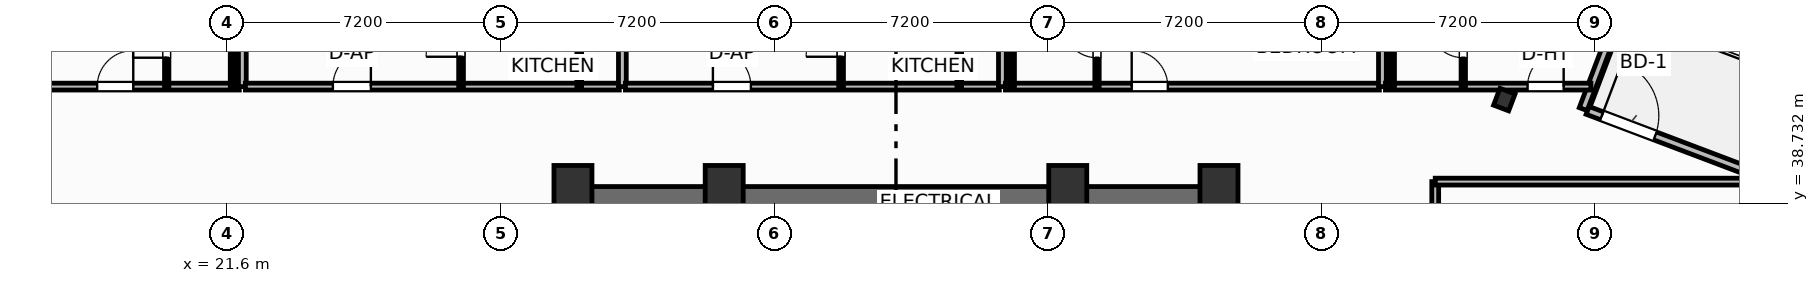
"""IFC4 building model, lengths in metres.
Left out: names, types, materials, properties, quantities, classifications, styles, units other than length and angle.
Written with IfcOpenShell. Run it as: python <this file> out.ifc"""

import sys

from ifc_helpers import new_model, si_unit, direction, frame, frame_2d, origin, origin_2d, place, context, subcontext, project, spatial, rectangle, i_section, extrude, element, fill, save


model = new_model("IFC4")
c1 = context("Model", 3, precision=1e-05, world=origin(), true_north=direction((0.0, 1.0)))
c2 = subcontext(c1, "Body", "Model", "MODEL_VIEW")
j1 = project(units=[si_unit("LENGTHUNIT", "METRE"), si_unit("PLANEANGLEUNIT", "RADIAN")], contexts=[c1])
p1 = place(None, origin())
s1 = spatial("IfcSite", under=j1, at=p1, CompositionType="ELEMENT")
p2 = place(p1, origin())
s2 = spatial("IfcBuilding", under=s1, at=p2, CompositionType="ELEMENT")
p3 = place(p2, frame((0.0, 0.0, 102.1)))
s3 = spatial("IfcBuildingStorey", under=s2, at=p3, CompositionType="ELEMENT", Elevation=102.1)
for number, where, z_axis, x_axis in (
    (1, (30.7, 39.05, 0.0), (0.0, 0.0, 1.0), (1.0, 0.0, 0.0)),
    (2, (34.68, 39.05, 0.0), (0.0, 0.0, 1.0), (1.0, 0.0, 0.0)),
    (3, (43.72, 39.05, 0.0), (0.0, 0.0, 1.0), (1.0, 0.0, 0.0)),
    (4, (47.7, 39.05, 0.0), (0.0, 0.0, 1.0), (1.0, 0.0, 0.0)),
):
    element("IfcColumn", number, at=place(p3, frame(where, z_axis=z_axis, x_axis=x_axis)), inside=s3, PredefinedType="COLUMN", context=c2, shape_type="SweptSolid", body=[
        extrude(rectangle(XDim=1.0, YDim=1.35, at=origin_2d()), origin(), (0.0, 0.0, 1.0), 3.7),
    ])
p4 = place(p3, frame((30.38, 38.795, 0.0), z_axis=(0.0, 0.0, 1.0), x_axis=(1.0, 0.0, 0.0)))
e5 = element("IfcWall", 5, at=p4, inside=s3, PredefinedType="SHEAR", context=c2, shape_type="SweptSolid", body=[
    extrude(rectangle(XDim=17.64, YDim=0.75, at=frame_2d((8.82, 0.0))), origin(), (0.0, 0.0, 1.0), 3.45),
])
p5 = place(p3, frame((55.208, 41.459, 0.0), z_axis=(0.0, 0.0, 1.0), x_axis=(0.935221751401, -0.354062530786, 0.0)))
e6 = element("IfcColumn", 6, at=p5, inside=s3, PredefinedType="COLUMN", context=c2, shape_type="SweptSolid", body=[
    extrude(i_section(OverallWidth=0.424, OverallDepth=0.474, WebThickness=0.048, FlangeThickness=0.077, FilletRadius=0.025, at=origin_2d()), origin(), (0.0, 0.0, 1.0), 3.7),
])
p6 = place(p3, frame((57.399, 41.175, 0.0), z_axis=(0.0, 0.0, 1.0), x_axis=(0.935227640088, -0.354046976001, 0.0)))
e7 = element("IfcWall", 7, at=p6, inside=s3, PredefinedType="SOLIDWALL", context=c2, shape_type="SweptSolid", body=[
    extrude(rectangle(XDim=6.0, YDim=0.22, at=frame_2d((3.0, 0.0))), origin(), (0.0, 0.0, 1.0), 2.73),
])
p7 = place(p6, frame((0.4, 0.0, 0.0)))
e8 = element("IfcOpeningElement", 8, at=p7, cuts=e7, PredefinedType="OPENING", context=c2, shape_type="SweptSolid", body=[
    extrude(rectangle(XDim=1.5, YDim=2.25, at=frame_2d((0.75, 1.125))), frame((0.0, 0.12, 0.0), z_axis=(0.0, -1.0, 0.0), x_axis=(1.0, 0.0, 0.0)), (0.0, 0.0, 1.0), 0.24),
])
p8 = place(p3, frame((57.284, 41.208, 0.0), z_axis=(0.0, 0.0, 1.0), x_axis=(0.354128469405, 0.935196785258, 0.0)))
e9 = element("IfcWall", 9, at=p8, inside=s3, PredefinedType="SOLIDWALL", context=c2, shape_type="SweptSolid", body=[
    extrude(rectangle(XDim=2.1, YDim=0.22, at=frame_2d((1.05, 0.0))), origin(), (0.0, 0.0, 1.0), 2.73),
])
p9 = place(p3, frame((5.646, 41.8, 0.0), z_axis=(0.0, 0.0, 1.0), x_axis=(1.0, 0.0, 0.0)))
e10 = element("IfcWall", 10, at=p9, inside=s3, PredefinedType="PARTITIONING", context=c2, shape_type="SweptSolid", body=[
    extrude(rectangle(XDim=16.274, YDim=0.18, at=frame_2d((8.137, 0.0))), origin(), (0.0, 0.0, 1.0), 3.45),
])
p10 = place(p9, frame((12.534, 0.0, 0.0)))
e11 = element("IfcOpeningElement", 11, at=p10, cuts=e10, PredefinedType="OPENING", context=c2, shape_type="SweptSolid", body=[
    extrude(rectangle(XDim=0.95, YDim=2.15, at=frame_2d((0.475, 1.075))), frame((0.0, 0.1, 0.0), z_axis=(0.0, -1.0, 0.0), x_axis=(1.0, 0.0, 0.0)), (0.0, 0.0, 1.0), 0.2),
])
p11 = place(p3, frame((20.01, 41.8, 0.0), z_axis=(0.0, 0.0, 1.0), x_axis=(0.0, 1.0, 0.0)))
e12 = element("IfcWall", 12, at=p11, inside=s3, PredefinedType="PARTITIONING", context=c2, shape_type="SweptSolid", body=[
    extrude(rectangle(XDim=2.52, YDim=0.115, at=frame_2d((1.26, 0.0))), origin(), (0.0, 0.0, 1.0), 3.45),
])
p12 = place(p11, frame((0.76, 0.0, 0.0)))
e13 = element("IfcOpeningElement", 13, at=p12, cuts=e12, PredefinedType="OPENING", context=c2, shape_type="SweptSolid", body=[
    extrude(rectangle(XDim=0.9, YDim=2.05, at=frame_2d((0.45, 1.025))), frame((0.0, 0.067, 0.0), z_axis=(0.0, -1.0, 0.0), x_axis=(1.0, 0.0, 0.0)), (0.0, 0.0, 1.0), 0.135),
])
p13 = place(p3, frame((21.74, 41.8, 0.0), z_axis=(0.0, 0.0, 1.0), x_axis=(0.0, 1.0, 0.0)))
e14 = element("IfcWall", 14, at=p13, inside=s3, PredefinedType="PARTITIONING", context=c2, shape_type="SweptSolid", body=[
    extrude(rectangle(XDim=2.52, YDim=0.115, at=frame_2d((1.26, 0.0))), origin(), (0.0, 0.0, 1.0), 3.45),
])
p14 = place(p3, frame((22.0, 41.8, 0.0), z_axis=(0.0, 0.0, 1.0), x_axis=(0.0, 1.0, 0.0)))
e15 = element("IfcWall", 15, at=p14, inside=s3, PredefinedType="PARTITIONING", context=c2, shape_type="SweptSolid", body=[
    extrude(rectangle(XDim=14.906, YDim=0.205, at=frame_2d((7.453, 0.0))), origin(), (0.0, 0.0, 1.0), 3.45),
])
p15 = place(p3, frame((22.08, 41.8, 0.0), z_axis=(0.0, 0.0, 1.0), x_axis=(1.0, 0.0, 0.0)))
e16 = element("IfcWall", 16, at=p15, inside=s3, PredefinedType="PARTITIONING", context=c2, shape_type="SweptSolid", body=[
    extrude(rectangle(XDim=9.84, YDim=0.18, at=frame_2d((4.92, 0.0))), origin(), (0.0, 0.0, 1.0), 3.45),
])
p16 = place(p15, frame((2.302, 0.0, 0.0)))
e17 = element("IfcOpeningElement", 17, at=p16, cuts=e16, PredefinedType="OPENING", context=c2, shape_type="SweptSolid", body=[
    extrude(rectangle(XDim=1.0, YDim=2.2, at=frame_2d((0.5, 1.1))), frame((0.0, 0.1, 0.0), z_axis=(0.0, -1.0, 0.0), x_axis=(1.0, 0.0, 0.0)), (0.0, 0.0, 1.0), 0.2),
])
p17 = place(p3, frame((27.755, 41.8, 0.0), z_axis=(0.0, 0.0, 1.0), x_axis=(0.0, 1.0, 0.0)))
e18 = element("IfcWall", 18, at=p17, inside=s3, PredefinedType="PARTITIONING", context=c2, shape_type="SweptSolid", body=[
    extrude(rectangle(XDim=12.811, YDim=0.125, at=frame_2d((6.405, 0.0))), origin(), (0.0, 0.0, 1.0), 3.45),
])
p18 = place(p17, frame((0.785, 0.0, 0.0)))
e19 = element("IfcOpeningElement", 19, at=p18, cuts=e18, PredefinedType="OPENING", context=c2, shape_type="SweptSolid", body=[
    extrude(rectangle(XDim=0.92, YDim=2.05, at=frame_2d((0.46, 1.025))), frame((0.0, 0.073, 0.0), z_axis=(0.0, -1.0, 0.0), x_axis=(1.0, 0.0, 0.0)), (0.0, 0.0, 1.0), 0.145),
])
p19 = place(p17, frame((3.037, 0.0, 0.0)))
e20 = element("IfcOpeningElement", 20, at=p19, cuts=e18, PredefinedType="OPENING", context=c2, shape_type="SweptSolid", body=[
    extrude(rectangle(XDim=0.9, YDim=2.05, at=frame_2d((0.45, 1.025))), frame((0.0, 0.073, 0.0), z_axis=(0.0, -1.0, 0.0), x_axis=(1.0, 0.0, 0.0)), (0.0, 0.0, 1.0), 0.145),
])
p20 = place(p17, frame((10.089, 0.0, 0.0)))
e21 = element("IfcOpeningElement", 21, at=p20, cuts=e18, PredefinedType="OPENING", context=c2, shape_type="SweptSolid", body=[
    extrude(rectangle(XDim=0.92, YDim=2.05, at=frame_2d((0.46, 1.025))), frame((0.0, 0.073, 0.0), z_axis=(0.0, -1.0, 0.0), x_axis=(1.0, 0.0, 0.0)), (0.0, 0.0, 1.0), 0.145),
])
p21 = place(p3, frame((30.865, 41.8, 0.0), z_axis=(0.0, 0.0, 1.0), x_axis=(0.0, 1.0, 0.0)))
e22 = element("IfcWall", 22, at=p21, inside=s3, PredefinedType="PARTITIONING", context=c2, shape_type="SweptSolid", body=[
    extrude(rectangle(XDim=2.41, YDim=0.125, at=frame_2d((1.205, 0.0))), origin(), (0.0, 0.0, 1.0), 3.45),
])
p22 = place(p3, frame((32.0, 41.8, 0.0), z_axis=(0.0, 0.0, 1.0), x_axis=(0.0, 1.0, 0.0)))
e23 = element("IfcWall", 23, at=p22, inside=s3, PredefinedType="PARTITIONING", context=c2, shape_type="SweptSolid", body=[
    extrude(rectangle(XDim=8.958, YDim=0.205, at=frame_2d((4.479, 0.0))), origin(), (0.0, 0.0, 1.0), 3.45),
])
p23 = place(p3, frame((32.08, 41.8, 0.0), z_axis=(0.0, 0.0, 1.0), x_axis=(1.0, 0.0, 0.0)))
e24 = element("IfcWall", 24, at=p23, inside=s3, PredefinedType="PARTITIONING", context=c2, shape_type="SweptSolid", body=[
    extrude(rectangle(XDim=9.84, YDim=0.18, at=frame_2d((4.92, 0.0))), origin(), (0.0, 0.0, 1.0), 3.45),
])
p24 = place(p23, frame((2.302, 0.0, 0.0)))
e25 = element("IfcOpeningElement", 25, at=p24, cuts=e24, PredefinedType="OPENING", context=c2, shape_type="SweptSolid", body=[
    extrude(rectangle(XDim=1.0, YDim=2.2, at=frame_2d((0.5, 1.1))), frame((0.0, 0.1, 0.0), z_axis=(0.0, -1.0, 0.0), x_axis=(1.0, 0.0, 0.0)), (0.0, 0.0, 1.0), 0.2),
])
p25 = place(p3, frame((37.755, 41.8, 0.0), z_axis=(0.0, 0.0, 1.0), x_axis=(0.0, 1.0, 0.0)))
e26 = element("IfcWall", 26, at=p25, inside=s3, PredefinedType="PARTITIONING", context=c2, shape_type="SweptSolid", body=[
    extrude(rectangle(XDim=9.025, YDim=0.125, at=frame_2d((4.512, 0.0))), origin(), (0.0, 0.0, 1.0), 3.45),
])
p26 = place(p25, frame((0.785, 0.0, 0.0)))
e27 = element("IfcOpeningElement", 27, at=p26, cuts=e26, PredefinedType="OPENING", context=c2, shape_type="SweptSolid", body=[
    extrude(rectangle(XDim=0.92, YDim=2.05, at=frame_2d((0.46, 1.025))), frame((0.0, 0.073, 0.0), z_axis=(0.0, -1.0, 0.0), x_axis=(1.0, 0.0, 0.0)), (0.0, 0.0, 1.0), 0.145),
])
p27 = place(p25, frame((3.037, 0.0, 0.0)))
e28 = element("IfcOpeningElement", 28, at=p27, cuts=e26, PredefinedType="OPENING", context=c2, shape_type="SweptSolid", body=[
    extrude(rectangle(XDim=0.9, YDim=2.05, at=frame_2d((0.45, 1.025))), frame((0.0, 0.073, 0.0), z_axis=(0.0, -1.0, 0.0), x_axis=(1.0, 0.0, 0.0)), (0.0, 0.0, 1.0), 0.145),
])
p28 = place(p25, frame((6.678, 0.0, 0.0)))
e29 = element("IfcOpeningElement", 29, at=p28, cuts=e26, PredefinedType="OPENING", context=c2, shape_type="SweptSolid", body=[
    extrude(rectangle(XDim=0.92, YDim=2.05, at=frame_2d((0.46, 1.025))), frame((0.0, 0.073, 0.0), z_axis=(0.0, -1.0, 0.0), x_axis=(1.0, 0.0, 0.0)), (0.0, 0.0, 1.0), 0.145),
])
p29 = place(p3, frame((40.865, 41.8, 0.0), z_axis=(0.0, 0.0, 1.0), x_axis=(0.0, 1.0, 0.0)))
e30 = element("IfcWall", 30, at=p29, inside=s3, PredefinedType="PARTITIONING", context=c2, shape_type="SweptSolid", body=[
    extrude(rectangle(XDim=2.41, YDim=0.125, at=frame_2d((1.205, 0.0))), origin(), (0.0, 0.0, 1.0), 3.45),
])
p30 = place(p3, frame((42.0, 41.8, 0.0), z_axis=(0.0, 0.0, 1.0), x_axis=(0.0, 1.0, 0.0)))
e31 = element("IfcWall", 31, at=p30, inside=s3, PredefinedType="PARTITIONING", context=c2, shape_type="SweptSolid", body=[
    extrude(rectangle(XDim=7.418, YDim=0.205, at=frame_2d((3.709, 0.0))), origin(), (0.0, 0.0, 1.0), 3.45),
])
p31 = place(p3, frame((42.08, 41.8, 0.0), z_axis=(0.0, 0.0, 1.0), x_axis=(1.0, 0.0, 0.0)))
e32 = element("IfcWall", 32, at=p31, inside=s3, PredefinedType="PARTITIONING", context=c2, shape_type="SweptSolid", body=[
    extrude(rectangle(XDim=9.84, YDim=0.18, at=frame_2d((4.92, 0.0))), origin(), (0.0, 0.0, 1.0), 3.45),
])
p32 = place(p31, frame((3.323, 0.0, 0.0)))
e33 = element("IfcOpeningElement", 33, at=p32, cuts=e32, PredefinedType="OPENING", context=c2, shape_type="SweptSolid", body=[
    extrude(rectangle(XDim=0.95, YDim=2.15, at=frame_2d((0.475, 1.075))), frame((0.0, 0.1, 0.0), z_axis=(0.0, -1.0, 0.0), x_axis=(1.0, 0.0, 0.0)), (0.0, 0.0, 1.0), 0.2),
])
p33 = place(p3, frame((44.49, 41.8, 0.0), z_axis=(0.0, 0.0, 1.0), x_axis=(0.0, 1.0, 0.0)))
e34 = element("IfcWall", 34, at=p33, inside=s3, PredefinedType="PARTITIONING", context=c2, shape_type="SweptSolid", body=[
    extrude(rectangle(XDim=2.52, YDim=0.115, at=frame_2d((1.26, 0.0))), origin(), (0.0, 0.0, 1.0), 3.45),
])
p34 = place(p33, frame((0.76, 0.0, 0.0)))
e35 = element("IfcOpeningElement", 35, at=p34, cuts=e34, PredefinedType="OPENING", context=c2, shape_type="SweptSolid", body=[
    extrude(rectangle(XDim=0.9, YDim=2.05, at=frame_2d((0.45, 1.025))), frame((0.0, 0.067, 0.0), z_axis=(0.0, -1.0, 0.0), x_axis=(1.0, 0.0, 0.0)), (0.0, 0.0, 1.0), 0.135),
])
p35 = place(p3, frame((42.26, 41.8, 0.0), z_axis=(0.0, 0.0, 1.0), x_axis=(0.0, 1.0, 0.0)))
e36 = element("IfcWall", 36, at=p35, inside=s3, PredefinedType="PARTITIONING", context=c2, shape_type="SweptSolid", body=[
    extrude(rectangle(XDim=2.52, YDim=0.115, at=frame_2d((1.26, 0.0))), origin(), (0.0, 0.0, 1.0), 3.45),
])
p36 = place(p3, frame((52.0, 41.8, 0.0), z_axis=(0.0, 0.0, 1.0), x_axis=(0.0, 1.0, 0.0)))
e37 = element("IfcWall", 37, at=p36, inside=s3, PredefinedType="PARTITIONING", context=c2, shape_type="SweptSolid", body=[
    extrude(rectangle(XDim=3.632, YDim=0.205, at=frame_2d((1.816, 0.0))), origin(), (0.0, 0.0, 1.0), 3.45),
])
p37 = place(p3, frame((52.08, 41.8, 0.0), z_axis=(0.0, 0.0, 1.0), x_axis=(1.0, 0.0, 0.0)))
e38 = element("IfcWall", 38, at=p37, inside=s3, PredefinedType="PARTITIONING", context=c2, shape_type="SweptSolid", body=[
    extrude(rectangle(XDim=5.406, YDim=0.18, at=frame_2d((2.703, 0.0))), origin(), (0.0, 0.0, 1.0), 3.45),
])
p38 = place(p37, frame((3.74, 0.0, 0.0)))
e39 = element("IfcOpeningElement", 39, at=p38, cuts=e38, PredefinedType="OPENING", context=c2, shape_type="SweptSolid", body=[
    extrude(rectangle(XDim=0.95, YDim=2.15, at=frame_2d((0.475, 1.075))), frame((0.0, 0.1, 0.0), z_axis=(0.0, -1.0, 0.0), x_axis=(1.0, 0.0, 0.0)), (0.0, 0.0, 1.0), 0.2),
])
p39 = place(p3, frame((54.128, 41.8, 0.0), z_axis=(0.0, 0.0, 1.0), x_axis=(0.0, 1.0, 0.0)))
e40 = element("IfcWall", 40, at=p39, inside=s3, PredefinedType="PARTITIONING", context=c2, shape_type="SweptSolid", body=[
    extrude(rectangle(XDim=2.52, YDim=0.115, at=frame_2d((1.26, 0.0))), origin(), (0.0, 0.0, 1.0), 3.45),
])
p40 = place(p39, frame((0.76, 0.0, 0.0)))
e41 = element("IfcOpeningElement", 41, at=p40, cuts=e40, PredefinedType="OPENING", context=c2, shape_type="SweptSolid", body=[
    extrude(rectangle(XDim=0.9, YDim=2.05, at=frame_2d((0.45, 1.025))), frame((0.0, 0.067, 0.0), z_axis=(0.0, -1.0, 0.0), x_axis=(1.0, 0.0, 0.0)), (0.0, 0.0, 1.0), 0.135),
])
p41 = place(p3, frame((52.26, 41.8, 0.0), z_axis=(0.0, 0.0, 1.0), x_axis=(0.0, 1.0, 0.0)))
e42 = element("IfcWall", 42, at=p41, inside=s3, PredefinedType="PARTITIONING", context=c2, shape_type="SweptSolid", body=[
    extrude(rectangle(XDim=2.52, YDim=0.115, at=frame_2d((1.26, 0.0))), origin(), (0.0, 0.0, 1.0), 3.45),
])
p42 = place(p3, frame((53.39, 26.84, 0.0), z_axis=(0.0, 0.0, 1.0), x_axis=(0.0, 1.0, 0.0)))
e43 = element("IfcWall", 43, at=p42, inside=s3, PredefinedType="PARTITIONING", context=c2, shape_type="SweptSolid", body=[
    extrude(rectangle(XDim=12.46, YDim=0.18, at=frame_2d((6.23, 0.0))), origin(), (0.0, 0.0, 1.0), 3.45),
])
p43 = place(p42, frame((0.618, 0.0, 0.0)))
e44 = element("IfcOpeningElement", 44, at=p43, cuts=e43, PredefinedType="OPENING", context=c2, shape_type="SweptSolid", body=[
    extrude(rectangle(XDim=0.92, YDim=2.05, at=frame_2d((0.46, 1.025))), frame((0.0, 0.1, 0.0), z_axis=(0.0, -1.0, 0.0), x_axis=(1.0, 0.0, 0.0)), (0.0, 0.0, 1.0), 0.2),
])
p44 = place(p3, frame((53.39, 39.3, 0.0), z_axis=(0.0, 0.0, 1.0), x_axis=(1.0, 0.0, 0.0)))
e45 = element("IfcWall", 45, at=p44, inside=s3, PredefinedType="PARTITIONING", context=c2, shape_type="SweptSolid", body=[
    extrude(rectangle(XDim=8.876, YDim=0.18, at=frame_2d((4.438, 0.0))), origin(), (0.0, 0.0, 1.0), 3.45),
])
p45 = place(p7, origin())
e46 = element("IfcDoor", 46, at=p45, inside=s3, OperationType="SINGLE_SWING_LEFT", PredefinedType="DOOR", context=c2, shape_type="SweptSolid", body=[
    extrude(rectangle(XDim=1.5, YDim=2.25, at=frame_2d((0.75, 1.125))), frame((0.0, 0.025, 0.0), z_axis=(0.0, -1.0, 0.0), x_axis=(1.0, 0.0, 0.0)), (0.0, 0.0, 1.0), 0.05),
])
fill(e8, e46)
p46 = place(p10, origin())
e47 = element("IfcDoor", 47, at=p46, inside=s3, OperationType="SINGLE_SWING_RIGHT", PredefinedType="DOOR", context=c2, shape_type="SweptSolid", body=[
    extrude(rectangle(XDim=0.95, YDim=2.15, at=frame_2d((0.475, 1.075))), frame((0.0, 0.025, 0.0), z_axis=(0.0, -1.0, 0.0), x_axis=(1.0, 0.0, 0.0)), (0.0, 0.0, 1.0), 0.05),
])
fill(e11, e47)
p47 = place(p12, origin())
e48 = element("IfcDoor", 48, at=p47, inside=s3, OperationType="SINGLE_SWING_LEFT", PredefinedType="DOOR", context=c2, shape_type="SweptSolid", body=[
    extrude(rectangle(XDim=0.9, YDim=2.05, at=frame_2d((0.45, 1.025))), frame((0.0, 0.025, 0.0), z_axis=(0.0, -1.0, 0.0), x_axis=(1.0, 0.0, 0.0)), (0.0, 0.0, 1.0), 0.05),
])
fill(e13, e48)
p48 = place(p16, origin())
e49 = element("IfcDoor", 49, at=p48, inside=s3, OperationType="SINGLE_SWING_RIGHT", PredefinedType="DOOR", context=c2, shape_type="SweptSolid", body=[
    extrude(rectangle(XDim=1.0, YDim=2.2, at=frame_2d((0.5, 1.1))), frame((0.0, 0.025, 0.0), z_axis=(0.0, -1.0, 0.0), x_axis=(1.0, 0.0, 0.0)), (0.0, 0.0, 1.0), 0.05),
])
fill(e17, e49)
p49 = place(p18, origin())
e50 = element("IfcDoor", 50, at=p49, inside=s3, OperationType="SINGLE_SWING_LEFT", PredefinedType="DOOR", context=c2, shape_type="SweptSolid", body=[
    extrude(rectangle(XDim=0.92, YDim=2.05, at=frame_2d((0.46, 1.025))), frame((0.0, 0.025, 0.0), z_axis=(0.0, -1.0, 0.0), x_axis=(1.0, 0.0, 0.0)), (0.0, 0.0, 1.0), 0.05),
])
fill(e19, e50)
p50 = place(p24, origin())
e51 = element("IfcDoor", 51, at=p50, inside=s3, OperationType="SINGLE_SWING_LEFT", PredefinedType="DOOR", context=c2, shape_type="SweptSolid", body=[
    extrude(rectangle(XDim=1.0, YDim=2.2, at=frame_2d((0.5, 1.1))), frame((0.0, 0.025, 0.0), z_axis=(0.0, -1.0, 0.0), x_axis=(1.0, 0.0, 0.0)), (0.0, 0.0, 1.0), 0.05),
])
fill(e25, e51)
p51 = place(p26, origin())
e52 = element("IfcDoor", 52, at=p51, inside=s3, OperationType="SINGLE_SWING_LEFT", PredefinedType="DOOR", context=c2, shape_type="SweptSolid", body=[
    extrude(rectangle(XDim=0.92, YDim=2.05, at=frame_2d((0.46, 1.025))), frame((0.0, 0.025, 0.0), z_axis=(0.0, -1.0, 0.0), x_axis=(1.0, 0.0, 0.0)), (0.0, 0.0, 1.0), 0.05),
])
fill(e27, e52)
p52 = place(p32, origin())
e53 = element("IfcDoor", 53, at=p52, inside=s3, OperationType="SINGLE_SWING_LEFT", PredefinedType="DOOR", context=c2, shape_type="SweptSolid", body=[
    extrude(rectangle(XDim=0.95, YDim=2.15, at=frame_2d((0.475, 1.075))), frame((0.0, 0.025, 0.0), z_axis=(0.0, -1.0, 0.0), x_axis=(1.0, 0.0, 0.0)), (0.0, 0.0, 1.0), 0.05),
])
fill(e33, e53)
p53 = place(p34, origin())
e54 = element("IfcDoor", 54, at=p53, inside=s3, OperationType="SINGLE_SWING_RIGHT", PredefinedType="DOOR", context=c2, shape_type="SweptSolid", body=[
    extrude(rectangle(XDim=0.9, YDim=2.05, at=frame_2d((0.45, 1.025))), frame((0.0, 0.025, 0.0), z_axis=(0.0, -1.0, 0.0), x_axis=(1.0, 0.0, 0.0)), (0.0, 0.0, 1.0), 0.05),
])
fill(e35, e54)
p54 = place(p38, origin())
e55 = element("IfcDoor", 55, at=p54, inside=s3, OperationType="SINGLE_SWING_RIGHT", PredefinedType="DOOR", context=c2, shape_type="SweptSolid", body=[
    extrude(rectangle(XDim=0.95, YDim=2.15, at=frame_2d((0.475, 1.075))), frame((0.0, 0.025, 0.0), z_axis=(0.0, -1.0, 0.0), x_axis=(1.0, 0.0, 0.0)), (0.0, 0.0, 1.0), 0.05),
])
fill(e39, e55)
p55 = place(p40, origin())
e56 = element("IfcDoor", 56, at=p55, inside=s3, OperationType="SINGLE_SWING_RIGHT", PredefinedType="DOOR", context=c2, shape_type="SweptSolid", body=[
    extrude(rectangle(XDim=0.9, YDim=2.05, at=frame_2d((0.45, 1.025))), frame((0.0, 0.025, 0.0), z_axis=(0.0, -1.0, 0.0), x_axis=(1.0, 0.0, 0.0)), (0.0, 0.0, 1.0), 0.05),
])
fill(e41, e56)
save(model, sys.argv[1])
